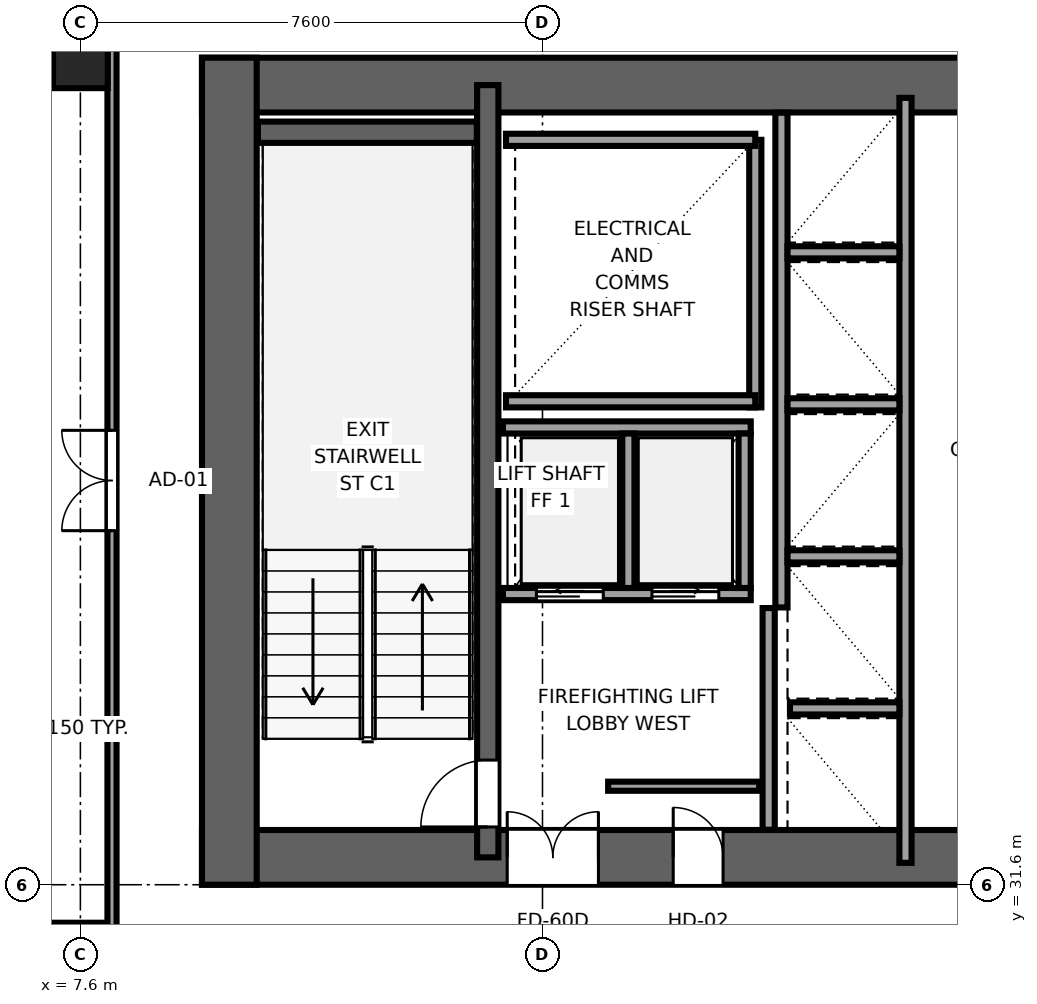
"""IFC4 building model, lengths in metres.
Left out: names, types, materials, properties, quantities, classifications, styles, units other than length and angle.
Written with IfcOpenShell. Run it as: python <this file> out.ifc"""

import sys

from ifc_helpers import new_model, si_unit, direction, frame, frame_2d, origin, origin_2d, place, context, subcontext, project, spatial, rectangle, extrude, source, transform, mapped, element, fill, save


model = new_model("IFC4")
c1 = context("Model", 3, precision=1e-05, world=origin(), true_north=direction((0.0, 1.0)))
c2 = subcontext(c1, "Body", "Model", "MODEL_VIEW")
j1 = project(units=[si_unit("LENGTHUNIT", "METRE"), si_unit("PLANEANGLEUNIT", "RADIAN")], contexts=[c1])
p1 = place(None, origin())
s1 = spatial("IfcSite", under=j1, at=p1, CompositionType="ELEMENT")
p2 = place(p1, origin())
s2 = spatial("IfcBuilding", under=s1, at=p2, CompositionType="ELEMENT")
p3 = place(p2, frame((0.0, 0.0, 78.15)))
s3 = spatial("IfcBuildingStorey", under=s2, at=p3, CompositionType="ELEMENT", Elevation=78.15)
p4 = place(p3, frame((9.6, 32.05, 0.0), z_axis=(0.0, 0.0, 1.0), x_axis=(1.0, 0.0, 0.0)))
e1 = element("IfcWall", 1, at=p4, inside=s3, PredefinedType="SHEAR", context=c2, shape_type="SweptSolid", body=[
    extrude(rectangle(XDim=26.8, YDim=0.9, at=frame_2d((13.4, 0.0))), origin(), (0.0, 0.0, 1.0), 3.55),
])
p5 = place(p4, frame((6.52, 0.0, 0.0), z_axis=(0.0, 0.0, 1.0), x_axis=(-1.0, 0.0, 0.0)))
e2 = element("IfcOpeningElement", 2, at=p5, cuts=e1, PredefinedType="OPENING", context=c2, shape_type="SweptSolid", body=[
    extrude(rectangle(XDim=1.5, YDim=2.04, at=frame_2d((0.75, 1.02))), frame((0.0, 0.46, 0.0), z_axis=(0.0, -1.0, 0.0), x_axis=(1.0, 0.0, 0.0)), (0.0, 0.0, 1.0), 0.92),
])
p6 = place(p4, frame((14.15, 0.0, 0.0), z_axis=(0.0, 0.0, 1.0), x_axis=(-1.0, 0.0, 0.0)))
e3 = element("IfcOpeningElement", 3, at=p6, cuts=e1, PredefinedType="OPENING", context=c2, shape_type="SweptSolid", body=[
    extrude(rectangle(XDim=1.5, YDim=2.04, at=frame_2d((0.75, 1.02))), frame((0.0, 0.46, 0.0), z_axis=(0.0, -1.0, 0.0), x_axis=(1.0, 0.0, 0.0)), (0.0, 0.0, 1.0), 0.92),
])
p7 = place(p4, frame((20.45, 0.0, 0.0), z_axis=(0.0, 0.0, 1.0), x_axis=(-1.0, 0.0, 0.0)))
e4 = element("IfcOpeningElement", 4, at=p7, cuts=e1, PredefinedType="OPENING", context=c2, shape_type="SweptSolid", body=[
    extrude(rectangle(XDim=1.5, YDim=2.04, at=frame_2d((0.75, 1.02))), frame((0.0, 0.46, 0.0), z_axis=(0.0, -1.0, 0.0), x_axis=(1.0, 0.0, 0.0)), (0.0, 0.0, 1.0), 0.92),
])
p8 = place(p4, frame((8.57, 0.0, 0.0), z_axis=(0.0, 0.0, 1.0), x_axis=(-1.0, 0.0, 0.0)))
e5 = element("IfcOpeningElement", 5, at=p8, cuts=e1, PredefinedType="OPENING", context=c2, shape_type="SweptSolid", body=[
    extrude(rectangle(XDim=0.82, YDim=2.01, at=frame_2d((0.41, 1.005))), frame((0.0, 0.46, 0.0), z_axis=(0.0, -1.0, 0.0), x_axis=(1.0, 0.0, 0.0)), (0.0, 0.0, 1.0), 0.92),
])
p9 = place(p3, frame((9.6, 44.75, 0.0), z_axis=(0.0, 0.0, 1.0), x_axis=(1.0, 0.0, 0.0)))
e6 = element("IfcWall", 6, at=p9, inside=s3, PredefinedType="SHEAR", context=c2, shape_type="SweptSolid", body=[
    extrude(rectangle(XDim=26.8, YDim=0.9, at=frame_2d((13.4, 0.0))), origin(), (0.0, 0.0, 1.0), 3.55),
])
p10 = place(p3, frame((10.05, 31.6, 0.0), z_axis=(0.0, 0.0, 1.0), x_axis=(0.0, 1.0, 0.0)))
e7 = element("IfcWall", 7, at=p10, inside=s3, PredefinedType="SHEAR", context=c2, shape_type="SweptSolid", body=[
    extrude(rectangle(XDim=13.6, YDim=0.9, at=frame_2d((6.8, 0.0))), origin(), (0.0, 0.0, 1.0), 3.55),
])
p11 = place(p3, frame((14.3, 32.05, 0.0), z_axis=(0.0, 0.0, 1.0), x_axis=(0.0, 1.0, 0.0)))
e8 = element("IfcWall", 8, at=p11, inside=s3, PredefinedType="SHEAR", context=c2, shape_type="SweptSolid", body=[
    extrude(rectangle(XDim=12.7, YDim=0.35, at=frame_2d((6.35, 0.0))), origin(), (0.0, 0.0, 1.0), 3.55),
])
p12 = place(p11, frame((0.5, 0.0, 0.0)))
e9 = element("IfcOpeningElement", 9, at=p12, cuts=e8, PredefinedType="OPENING", context=c2, shape_type="SweptSolid", body=[
    extrude(rectangle(XDim=1.1, YDim=2.12, at=frame_2d((0.55, 1.06))), frame((0.0, 0.185, 0.0), z_axis=(0.0, -1.0, 0.0), x_axis=(1.0, 0.0, 0.0)), (0.0, 0.0, 1.0), 0.37),
])
p13 = place(p3, frame((10.52, 43.975, 0.0), z_axis=(0.0, 0.0, 1.0), x_axis=(1.0, 0.0, 0.0)))
e10 = element("IfcWall", 10, at=p13, inside=s3, PredefinedType="SHEAR", context=c2, shape_type="SweptSolid", body=[
    extrude(rectangle(XDim=3.6, YDim=0.35, at=frame_2d((1.8, 0.0))), origin(), (0.0, 0.0, 1.0), 3.55),
])
m1 = source(origin(), c2, "Body", "SweptSolid", [
    extrude(rectangle(XDim=0.9, YDim=0.9, at=origin_2d()), origin(), (0.0, 0.0, 1.0), 3.55),
])
p14 = place(p3, frame((7.6, 45.15, 0.0), z_axis=(0.0, 0.0, 1.0), x_axis=(1.0, 0.0, 0.0)))
e11 = element("IfcColumn", 11, at=p14, inside=s3, PredefinedType="COLUMN", context=c2, shape_type="MappedRepresentation", body=[
    mapped(m1, transform((0.0, 0.0, 0.0), x_axis=(1.0, 0.0, 0.0), y_axis=(0.0, 1.0, 0.0), z_axis=(0.0, 0.0, 1.0), scale=1.0)),
])
p15 = place(p3, frame((18.7, 39.45, 0.0), z_axis=(0.0, 0.0, 1.0), x_axis=(0.0, 1.0, 0.0)))
e12 = element("IfcWall", 12, at=p15, inside=s3, PredefinedType="SOLIDWALL", context=c2, shape_type="SweptSolid", body=[
    extrude(rectangle(XDim=4.4, YDim=0.2, at=frame_2d((2.2, 0.0))), origin(), (0.0, 0.0, 1.0), 3.37),
])
for number, where, z_axis, x_axis in (
    (13, (14.6, 39.55, 0.0), (0.0, 0.0, 1.0), (1.0, 0.0, 0.0)),
    (14, (14.6, 43.85, 0.0), (0.0, 0.0, 1.0), (1.0, 0.0, 0.0)),
):
    element("IfcWall", number, at=place(p3, frame(where, z_axis=z_axis, x_axis=x_axis)), inside=s3, PredefinedType="SOLIDWALL", context=c2, shape_type="SweptSolid", body=[
        extrude(rectangle(XDim=4.1, YDim=0.2, at=frame_2d((2.05, 0.0))), origin(), (0.0, 0.0, 1.0), 3.37),
    ])
p16 = place(p3, frame((18.92, 32.504, 0.0), z_axis=(0.0, 0.0, 1.0), x_axis=(0.0, 1.0, 0.0)))
e15 = element("IfcWall", 15, at=p16, inside=s3, PredefinedType="SOLIDWALL", context=c2, shape_type="SweptSolid", body=[
    extrude(rectangle(XDim=3.646, YDim=0.2, at=frame_2d((1.823, 0.0))), origin(), (0.0, 0.0, 1.0), 3.37),
])
p17 = place(p3, frame((21.17, 31.96, 0.0), z_axis=(0.0, 0.0, 1.0), x_axis=(0.0, 1.0, 0.0)))
e16 = element("IfcWall", 16, at=p17, inside=s3, PredefinedType="SOLIDWALL", context=c2, shape_type="SweptSolid", body=[
    extrude(rectangle(XDim=12.58, YDim=0.2, at=frame_2d((6.29, 0.0))), origin(), (0.0, 0.0, 1.0), 3.37),
])
p18 = place(p3, frame((19.13, 36.16, 0.0), z_axis=(0.0, 0.0, 1.0), x_axis=(0.0, 1.0, 0.0)))
e17 = element("IfcWall", 17, at=p18, inside=s3, PredefinedType="SOLIDWALL", context=c2, shape_type="SweptSolid", body=[
    extrude(rectangle(XDim=8.136, YDim=0.2, at=frame_2d((4.068, 0.0))), origin(), (0.0, 0.0, 1.0), 3.37),
])
p19 = place(p3, frame((19.27, 34.5, 0.0), z_axis=(0.0, 0.0, 1.0), x_axis=(1.0, 0.0, 0.0)))
e18 = element("IfcWall", 18, at=p19, inside=s3, PredefinedType="SOLIDWALL", context=c2, shape_type="SweptSolid", body=[
    extrude(rectangle(XDim=1.8, YDim=0.2, at=frame_2d((0.9, 0.0))), origin(), (0.0, 0.0, 1.0), 3.37),
])
for number, where, z_axis, x_axis in (
    (19, (19.23, 37.0, 0.0), (0.0, 0.0, 1.0), (1.0, 0.0, 0.0)),
    (20, (19.23, 39.5, 0.0), (0.0, 0.0, 1.0), (1.0, 0.0, 0.0)),
    (21, (19.23, 42.0, 0.0), (0.0, 0.0, 1.0), (1.0, 0.0, 0.0)),
):
    element("IfcWall", number, at=place(p3, frame(where, z_axis=z_axis, x_axis=x_axis)), inside=s3, PredefinedType="SOLIDWALL", context=c2, shape_type="SweptSolid", body=[
        extrude(rectangle(XDim=1.84, YDim=0.2, at=frame_2d((0.92, 0.0))), origin(), (0.0, 0.0, 1.0), 3.37),
    ])
p20 = place(p3, frame((14.55, 36.38, 0.0), z_axis=(0.0, 0.0, 1.0), x_axis=(1.0, 0.0, 0.0)))
e22 = element("IfcWall", 22, at=p20, inside=s3, PredefinedType="SOLIDWALL", context=c2, shape_type="SweptSolid", body=[
    extrude(rectangle(XDim=4.075, YDim=0.2, at=frame_2d((2.038, 0.0))), origin(), (0.0, 0.0, 1.0), 3.37),
])
p21 = place(p20, frame((0.55, 0.0, 0.0)))
e23 = element("IfcOpeningElement", 23, at=p21, cuts=e22, PredefinedType="OPENING", context=c2, shape_type="SweptSolid", body=[
    extrude(rectangle(XDim=1.1, YDim=2.12, at=frame_2d((0.55, 1.06))), frame((0.0, 0.11, 0.0), z_axis=(0.0, -1.0, 0.0), x_axis=(1.0, 0.0, 0.0)), (0.0, 0.0, 1.0), 0.22),
])
p22 = place(p20, frame((2.45, 0.0, 0.0)))
e24 = element("IfcOpeningElement", 24, at=p22, cuts=e22, PredefinedType="OPENING", context=c2, shape_type="SweptSolid", body=[
    extrude(rectangle(XDim=1.1, YDim=2.12, at=frame_2d((0.55, 1.06))), frame((0.0, 0.11, 0.0), z_axis=(0.0, -1.0, 0.0), x_axis=(1.0, 0.0, 0.0)), (0.0, 0.0, 1.0), 0.22),
])
p23 = place(p3, frame((14.55, 39.12, 0.0), z_axis=(0.0, 0.0, 1.0), x_axis=(1.0, 0.0, 0.0)))
e25 = element("IfcWall", 25, at=p23, inside=s3, PredefinedType="SOLIDWALL", context=c2, shape_type="SweptSolid", body=[
    extrude(rectangle(XDim=4.075, YDim=0.2, at=frame_2d((2.038, 0.0))), origin(), (0.0, 0.0, 1.0), 3.37),
])
for number, where, z_axis, x_axis in (
    (26, (18.525, 36.48, 0.0), (0.0, 0.0, 1.0), (0.0, 1.0, 0.0)),
    (27, (16.613, 36.48, 0.0), (0.0, 0.0, 1.0), (0.0, 1.0, 0.0)),
):
    element("IfcWall", number, at=place(p3, frame(where, z_axis=z_axis, x_axis=x_axis)), inside=s3, PredefinedType="SOLIDWALL", context=c2, shape_type="SweptSolid", body=[
        extrude(rectangle(XDim=2.54, YDim=0.2, at=frame_2d((1.27, 0.0))), origin(), (0.0, 0.0, 1.0), 3.37),
    ])
p24 = place(p3, frame((16.28, 33.22, 0.0), z_axis=(0.0, 0.0, 1.0), x_axis=(1.0, 0.0, 0.0)))
e28 = element("IfcWall", 28, at=p24, inside=s3, PredefinedType="PARTITIONING", context=c2, shape_type="SweptSolid", body=[
    extrude(rectangle(XDim=2.485, YDim=0.15, at=frame_2d((1.242, 0.0))), origin(), (0.0, 0.0, 1.0), 3.37),
])
p25 = place(p3, frame((0.405, 30.9, 0.0), z_axis=(0.0, 0.0, 1.0), x_axis=(1.0, 0.0, 0.0)))
e29 = element("IfcWall", 29, at=p25, inside=s3, PredefinedType="PARTITIONING", context=c2, shape_type="SweptSolid", body=[
    extrude(rectangle(XDim=7.715, YDim=0.15, at=frame_2d((3.857, 0.0))), origin(), (0.0, 0.0, 1.0), 3.37),
])
p26 = place(p3, frame((8.12, 30.9, 0.0), z_axis=(0.0, 0.0, 1.0), x_axis=(0.0, 1.0, 0.0)))
e30 = element("IfcWall", 30, at=p26, inside=s3, PredefinedType="PARTITIONING", context=c2, shape_type="SweptSolid", body=[
    extrude(rectangle(XDim=14.695, YDim=0.15, at=frame_2d((7.348, 0.0))), origin(), (0.0, 0.0, 1.0), 3.37),
])
p27 = place(p26, frame((6.522, 0.0, 0.0)))
e31 = element("IfcOpeningElement", 31, at=p27, cuts=e30, PredefinedType="OPENING", context=c2, shape_type="SweptSolid", body=[
    extrude(rectangle(XDim=1.65, YDim=2.15, at=frame_2d((0.825, 1.075))), frame((0.0, 0.085, 0.0), z_axis=(0.0, -1.0, 0.0), x_axis=(1.0, 0.0, 0.0)), (0.0, 0.0, 1.0), 0.17),
])
m2 = source(origin(), c2, "Body", "SweptSolid", [
    extrude(rectangle(XDim=1.1, YDim=2.12, at=frame_2d((0.55, 1.06))), frame((0.0, 0.025, 0.0), z_axis=(0.0, -1.0, 0.0), x_axis=(1.0, 0.0, 0.0)), (0.0, 0.0, 1.0), 0.05),
])
p28 = place(p12, origin())
e32 = element("IfcDoor", 32, at=p28, inside=s3, OperationType="SINGLE_SWING_LEFT", PredefinedType="DOOR", context=c2, shape_type="MappedRepresentation", body=[
    mapped(m2, transform((0.0, 0.0, 0.0), x_axis=(1.0, 0.0, 0.0), y_axis=(0.0, 1.0, 0.0), z_axis=(0.0, 0.0, 1.0), scale=1.0)),
])
fill(e9, e32)
m3 = source(origin(), c2, "Body", "SweptSolid", [
    extrude(rectangle(XDim=1.5, YDim=2.04, at=frame_2d((0.75, 1.02))), frame((0.0, 0.025, 0.0), z_axis=(0.0, -1.0, 0.0), x_axis=(1.0, 0.0, 0.0)), (0.0, 0.0, 1.0), 0.05),
])
p29 = place(p5, origin())
e33 = element("IfcDoor", 33, at=p29, inside=s3, OperationType="DOUBLE_DOOR_SINGLE_SWING", PredefinedType="DOOR", context=c2, shape_type="MappedRepresentation", body=[
    mapped(m3, transform((0.0, 0.0, 0.0), x_axis=(1.0, 0.0, 0.0), y_axis=(0.0, 1.0, 0.0), z_axis=(0.0, 0.0, 1.0), scale=1.0)),
])
fill(e2, e33)
m4 = source(origin(), c2, "Body", "SweptSolid", [
    extrude(rectangle(XDim=0.82, YDim=2.01, at=frame_2d((0.41, 1.005))), frame((0.0, 0.025, 0.0), z_axis=(0.0, -1.0, 0.0), x_axis=(1.0, 0.0, 0.0)), (0.0, 0.0, 1.0), 0.05),
])
p30 = place(p8, origin())
e34 = element("IfcDoor", 34, at=p30, inside=s3, OperationType="SINGLE_SWING_LEFT", PredefinedType="DOOR", context=c2, shape_type="MappedRepresentation", body=[
    mapped(m4, transform((0.0, 0.0, 0.0), x_axis=(1.0, 0.0, 0.0), y_axis=(0.0, 1.0, 0.0), z_axis=(0.0, 0.0, 1.0), scale=1.0)),
])
fill(e5, e34)
m5 = source(origin(), c2, "Body", "SweptSolid", [
    extrude(rectangle(XDim=1.1, YDim=2.12, at=frame_2d((0.55, 1.06))), frame((0.0, 0.025, 0.0), z_axis=(0.0, -1.0, 0.0), x_axis=(1.0, 0.0, 0.0)), (0.0, 0.0, 1.0), 0.05),
])
p31 = place(p21, origin())
e35 = element("IfcDoor", 35, at=p31, inside=s3, OperationType="SLIDING_TO_LEFT", PredefinedType="DOOR", context=c2, shape_type="MappedRepresentation", body=[
    mapped(m5, transform((0.0, 0.0, 0.0), x_axis=(1.0, 0.0, 0.0), y_axis=(0.0, 1.0, 0.0), z_axis=(0.0, 0.0, 1.0), scale=1.0)),
])
fill(e23, e35)
p32 = place(p22, origin())
e36 = element("IfcDoor", 36, at=p32, inside=s3, OperationType="SLIDING_TO_RIGHT", PredefinedType="DOOR", context=c2, shape_type="MappedRepresentation", body=[
    mapped(m5, transform((0.0, 0.0, 0.0), x_axis=(1.0, 0.0, 0.0), y_axis=(0.0, 1.0, 0.0), z_axis=(0.0, 0.0, 1.0), scale=1.0)),
])
fill(e24, e36)
m6 = source(origin(), c2, "Body", "SweptSolid", [
    extrude(rectangle(XDim=1.65, YDim=2.15, at=frame_2d((0.825, 1.075))), frame((0.0, 0.025, 0.0), z_axis=(0.0, -1.0, 0.0), x_axis=(1.0, 0.0, 0.0)), (0.0, 0.0, 1.0), 0.05),
])
p33 = place(p27, origin())
e37 = element("IfcDoor", 37, at=p33, inside=s3, OperationType="DOUBLE_DOOR_SINGLE_SWING", PredefinedType="DOOR", context=c2, shape_type="MappedRepresentation", body=[
    mapped(m6, transform((0.0, 0.0, 0.0), x_axis=(1.0, 0.0, 0.0), y_axis=(0.0, 1.0, 0.0), z_axis=(0.0, 0.0, 1.0), scale=1.0)),
])
fill(e31, e37)
save(model, sys.argv[1])
